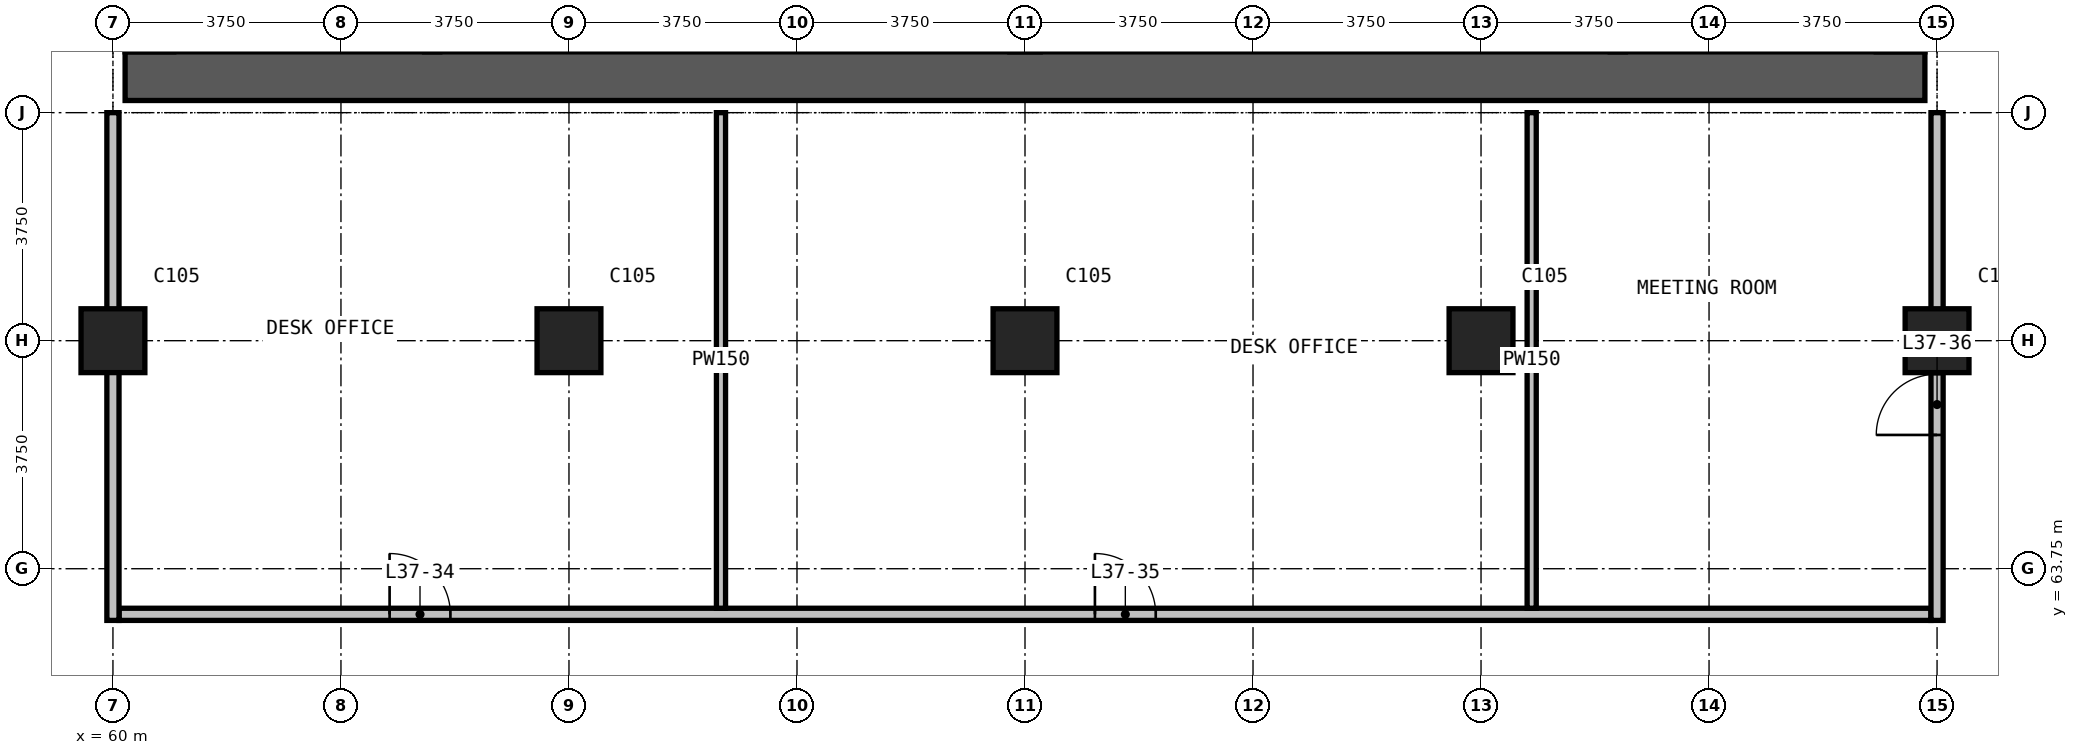
"""IFC4 building model, lengths in metres.
Left out: names, types, materials, properties, quantities, classifications, styles, units other than length and angle.
Written with IfcOpenShell. Run it as: python <this file> out.ifc"""

import sys

from ifc_helpers import new_model, si_unit, direction, frame, frame_2d, origin, origin_2d, place, context, subcontext, project, spatial, rectangle, extrude, element, fill, save


model = new_model("IFC4")
c1 = context("Model", 3, precision=1e-05, world=origin(), true_north=direction((0.0, 1.0)))
c2 = subcontext(c1, "Body", "Model", "MODEL_VIEW")
j1 = project(units=[si_unit("LENGTHUNIT", "METRE"), si_unit("PLANEANGLEUNIT", "RADIAN")], contexts=[c1])
p1 = place(None, origin())
s1 = spatial("IfcSite", under=j1, at=p1, CompositionType="ELEMENT")
p2 = place(p1, origin())
s2 = spatial("IfcBuilding", under=s1, at=p2, CompositionType="ELEMENT")
p3 = place(p2, frame((0.0, 0.0, 147.7)))
s3 = spatial("IfcBuildingStorey", under=s2, at=p3, CompositionType="ELEMENT", Elevation=147.7)
for number, where, z_axis, x_axis in (
    (1, (60.0, 67.5, 0.0), (0.0, 0.0, 1.0), (1.0, 0.0, 0.0)),
    (2, (67.5, 67.5, 0.0), (0.0, 0.0, 1.0), (1.0, 0.0, 0.0)),
    (3, (75.0, 67.5, 0.0), (0.0, 0.0, 1.0), (1.0, 0.0, 0.0)),
    (4, (82.5, 67.5, 0.0), (0.0, 0.0, 1.0), (1.0, 0.0, 0.0)),
    (5, (90.0, 67.5, 0.0), (0.0, 0.0, 1.0), (1.0, 0.0, 0.0)),
):
    element("IfcColumn", number, at=place(p3, frame(where, z_axis=z_axis, x_axis=x_axis)), inside=s3, PredefinedType="COLUMN", context=c2, shape_type="SweptSolid", body=[
        extrude(rectangle(XDim=1.05, YDim=1.05, at=origin_2d()), origin(), (0.0, 0.0, 1.0), 3.6),
    ])
p4 = place(p3, frame((60.2, 71.85, 0.0), z_axis=(0.0, 0.0, 1.0), x_axis=(1.0, 0.0, 0.0)))
e6 = element("IfcWall", 6, at=p4, inside=s3, PredefinedType="SHEAR", context=c2, shape_type="SweptSolid", body=[
    extrude(rectangle(XDim=29.6, YDim=0.8, at=frame_2d((14.8, 0.0))), origin(), (0.0, 0.0, 1.0), 3.6),
])
p5 = place(p3, frame((60.1, 63.0, 0.0), z_axis=(0.0, 0.0, 1.0), x_axis=(1.0, 0.0, 0.0)))
e7 = element("IfcWall", 7, at=p5, inside=s3, PredefinedType="PARTITIONING", context=c2, shape_type="SweptSolid", body=[
    extrude(rectangle(XDim=29.8, YDim=0.2, at=frame_2d((14.9, 0.0))), origin(), (0.0, 0.0, 1.0), 3.3),
])
p6 = place(p5, frame((4.45, 0.0, 0.0)))
e8 = element("IfcOpeningElement", 8, at=p6, cuts=e7, PredefinedType="OPENING", context=c2, shape_type="SweptSolid", body=[
    extrude(rectangle(XDim=1.0, YDim=2.2, at=frame_2d((0.5, 1.1))), frame((0.0, 0.11, 0.0), z_axis=(0.0, -1.0, 0.0), x_axis=(1.0, 0.0, 0.0)), (0.0, 0.0, 1.0), 0.22),
])
p7 = place(p5, frame((16.05, 0.0, 0.0)))
e9 = element("IfcOpeningElement", 9, at=p7, cuts=e7, PredefinedType="OPENING", context=c2, shape_type="SweptSolid", body=[
    extrude(rectangle(XDim=1.0, YDim=2.2, at=frame_2d((0.5, 1.1))), frame((0.0, 0.11, 0.0), z_axis=(0.0, -1.0, 0.0), x_axis=(1.0, 0.0, 0.0)), (0.0, 0.0, 1.0), 0.22),
])
p8 = place(p3, frame((60.0, 62.9, 0.0), z_axis=(0.0, 0.0, 1.0), x_axis=(0.0, 1.0, 0.0)))
e10 = element("IfcWall", 10, at=p8, inside=s3, PredefinedType="PARTITIONING", context=c2, shape_type="SweptSolid", body=[
    extrude(rectangle(XDim=8.35, YDim=0.2, at=frame_2d((4.175, 0.0))), origin(), (0.0, 0.0, 1.0), 3.3),
])
p9 = place(p3, frame((90.0, 62.9, 0.0), z_axis=(0.0, 0.0, 1.0), x_axis=(0.0, 1.0, 0.0)))
e11 = element("IfcWall", 11, at=p9, inside=s3, PredefinedType="PARTITIONING", context=c2, shape_type="SweptSolid", body=[
    extrude(rectangle(XDim=8.35, YDim=0.2, at=frame_2d((4.175, 0.0))), origin(), (0.0, 0.0, 1.0), 3.3),
])
p10 = place(p9, frame((3.05, 0.0, 0.0)))
e12 = element("IfcOpeningElement", 12, at=p10, cuts=e11, PredefinedType="OPENING", context=c2, shape_type="SweptSolid", body=[
    extrude(rectangle(XDim=1.0, YDim=2.2, at=frame_2d((0.5, 1.1))), frame((0.0, 0.11, 0.0), z_axis=(0.0, -1.0, 0.0), x_axis=(1.0, 0.0, 0.0)), (0.0, 0.0, 1.0), 0.22),
])
for number, where, z_axis, x_axis in (
    (13, (70.0, 63.1, 0.0), (0.0, 0.0, 1.0), (0.0, 1.0, 0.0)),
    (14, (83.333, 63.1, 0.0), (0.0, 0.0, 1.0), (0.0, 1.0, 0.0)),
):
    element("IfcWall", number, at=place(p3, frame(where, z_axis=z_axis, x_axis=x_axis)), inside=s3, PredefinedType="PARTITIONING", context=c2, shape_type="SweptSolid", body=[
        extrude(rectangle(XDim=8.15, YDim=0.15, at=frame_2d((4.075, 0.0))), origin(), (0.0, 0.0, 1.0), 3.3),
    ])
p11 = place(p6, origin())
e15 = element("IfcDoor", 15, at=p11, inside=s3, OperationType="SINGLE_SWING_RIGHT", PredefinedType="DOOR", context=c2, shape_type="SweptSolid", body=[
    extrude(rectangle(XDim=1.0, YDim=2.2, at=frame_2d((0.5, 1.1))), frame((0.0, 0.025, 0.0), z_axis=(0.0, -1.0, 0.0), x_axis=(1.0, 0.0, 0.0)), (0.0, 0.0, 1.0), 0.05),
])
fill(e8, e15)
p12 = place(p7, origin())
e16 = element("IfcDoor", 16, at=p12, inside=s3, OperationType="SINGLE_SWING_RIGHT", PredefinedType="DOOR", context=c2, shape_type="SweptSolid", body=[
    extrude(rectangle(XDim=1.0, YDim=2.2, at=frame_2d((0.5, 1.1))), frame((0.0, 0.025, 0.0), z_axis=(0.0, -1.0, 0.0), x_axis=(1.0, 0.0, 0.0)), (0.0, 0.0, 1.0), 0.05),
])
fill(e9, e16)
p13 = place(p10, origin())
e17 = element("IfcDoor", 17, at=p13, inside=s3, OperationType="SINGLE_SWING_LEFT", PredefinedType="DOOR", context=c2, shape_type="SweptSolid", body=[
    extrude(rectangle(XDim=1.0, YDim=2.2, at=frame_2d((0.5, 1.1))), frame((0.0, 0.025, 0.0), z_axis=(0.0, -1.0, 0.0), x_axis=(1.0, 0.0, 0.0)), (0.0, 0.0, 1.0), 0.05),
])
fill(e12, e17)
save(model, sys.argv[1])
